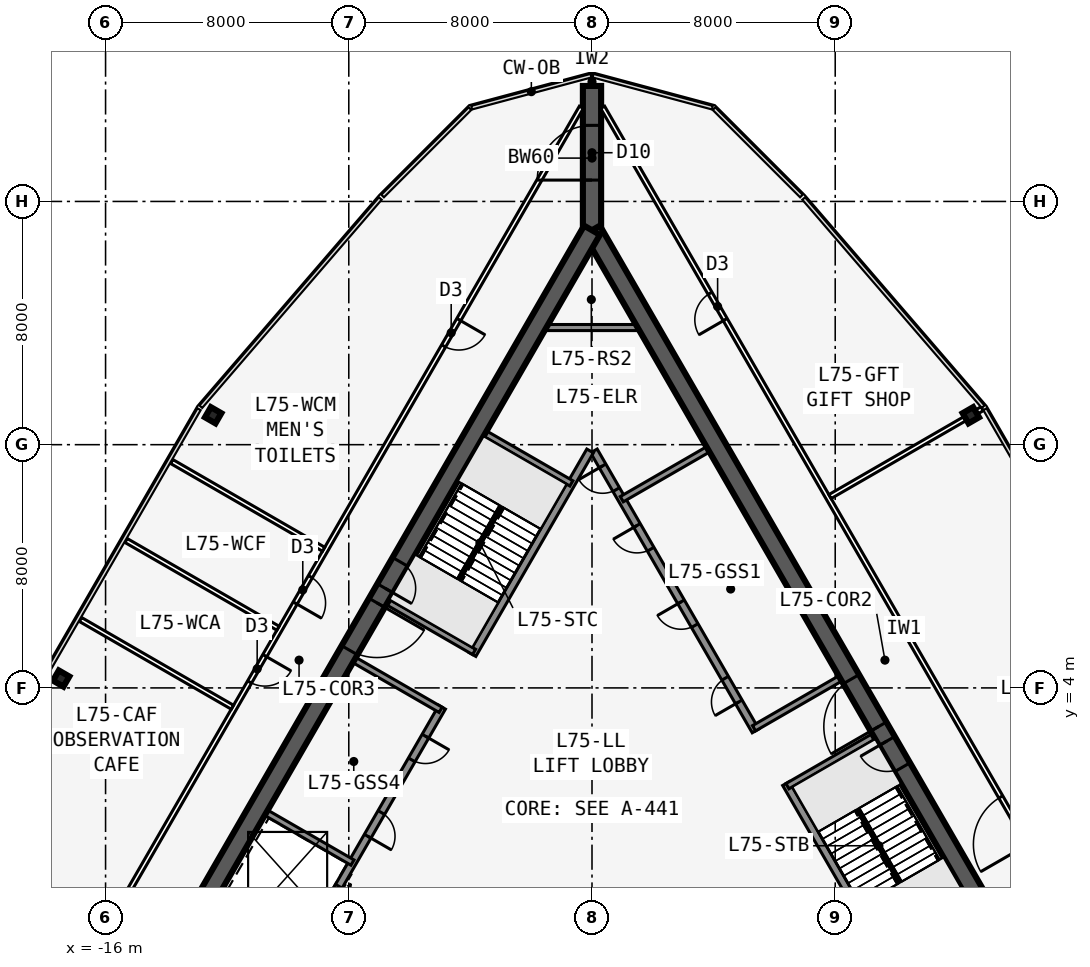
"""IFC4 building model, lengths in metres.
Left out: names, types, materials, properties, quantities, classifications, styles, units other than length and angle.
Written with IfcOpenShell. Run it as: python <this file> out.ifc"""

import sys

from ifc_helpers import new_model, si_unit, direction, frame, frame_2d, origin, origin_2d, place, context, subcontext, project, spatial, rectangle, i_section, extrude, element, fill, save


model = new_model("IFC4")
c1 = context("Model", 3, precision=1e-05, world=origin(), true_north=direction((0.0, 1.0)))
c2 = subcontext(c1, "Body", "Model", "MODEL_VIEW")
j1 = project(units=[si_unit("LENGTHUNIT", "METRE"), si_unit("PLANEANGLEUNIT", "RADIAN")], contexts=[c1])
p1 = place(None, origin())
s1 = spatial("IfcSite", under=j1, at=p1, CompositionType="ELEMENT")
p2 = place(p1, origin())
s2 = spatial("IfcBuilding", under=s1, at=p2, CompositionType="ELEMENT")
p3 = place(p2, frame((0.0, 0.0, 286.8)))
s3 = spatial("IfcBuildingStorey", under=s2, at=p3, CompositionType="ELEMENT", Elevation=286.8)
p4 = place(p3, frame((16.5, -9.526, 0.0), z_axis=(0.0, 0.0, 1.0), x_axis=(-0.499999749417, 0.866025548458, 0.0)))
e1 = element("IfcWall", 1, at=p4, inside=s3, PredefinedType="SHEAR", context=c2, shape_type="SweptSolid", body=[
    extrude(rectangle(XDim=33.0, YDim=0.6, at=frame_2d((16.5, 0.0))), origin(), (0.0, 0.0, 1.0), 6.0),
])
p5 = place(p4, frame((14.15, 0.0, 0.0)))
e2 = element("IfcOpeningElement", 2, at=p5, cuts=e1, PredefinedType="OPENING", context=c2, shape_type="SweptSolid", body=[
    extrude(rectangle(XDim=1.8, YDim=2.13, at=frame_2d((0.9, 1.065))), frame((0.0, 0.31, 0.0), z_axis=(0.0, -1.0, 0.0), x_axis=(1.0, 0.0, 0.0)), (0.0, 0.0, 1.0), 0.62),
])
p6 = place(p4, frame((12.6, 0.0, 0.0)))
e3 = element("IfcOpeningElement", 3, at=p6, cuts=e1, PredefinedType="OPENING", context=c2, shape_type="SweptSolid", body=[
    extrude(rectangle(XDim=1.0, YDim=2.13, at=frame_2d((0.5, 1.065))), frame((0.0, 0.31, 0.0), z_axis=(0.0, -1.0, 0.0), x_axis=(1.0, 0.0, 0.0)), (0.0, 0.0, 1.0), 0.62),
])
p7 = place(p3, frame((10.245, -5.843, 0.0), z_axis=(0.0, 0.0, 1.0), x_axis=(-0.499993009313, 0.866029439822, 0.0)))
e4 = element("IfcWall", 4, at=p7, inside=s3, PredefinedType="SOLIDWALL", context=c2, shape_type="SweptSolid", body=[
    extrude(rectangle(XDim=7.733, YDim=0.25, at=frame_2d((3.866, 0.0))), origin(), (0.0, 0.0, 1.0), 5.75),
])
p8 = place(p3, frame((5.379, 2.586, 0.0), z_axis=(0.0, 0.0, 1.0), x_axis=(-0.500001375892, 0.866024609411, 0.0)))
e5 = element("IfcWall", 5, at=p8, inside=s3, PredefinedType="SOLIDWALL", context=c2, shape_type="SweptSolid", body=[
    extrude(rectangle(XDim=10.633, YDim=0.25, at=frame_2d((5.316, 0.0))), origin(), (0.0, 0.0, 1.0), 5.75),
])
p9 = place(p8, frame((9.164, 0.0, 0.0)))
e6 = element("IfcOpeningElement", 6, at=p9, cuts=e5, PredefinedType="OPENING", context=c2, shape_type="SweptSolid", body=[
    extrude(rectangle(XDim=0.9, YDim=2.13, at=frame_2d((0.45, 1.065))), frame((0.0, 0.135, 0.0), z_axis=(0.0, -1.0, 0.0), x_axis=(1.0, 0.0, 0.0)), (0.0, 0.0, 1.0), 0.27),
])
p10 = place(p8, frame((1.1, 0.0, 0.0)))
e7 = element("IfcOpeningElement", 7, at=p10, cuts=e5, PredefinedType="OPENING", context=c2, shape_type="SweptSolid", body=[
    extrude(rectangle(XDim=0.9, YDim=2.13, at=frame_2d((0.45, 1.065))), frame((0.0, 0.135, 0.0), z_axis=(0.0, -1.0, 0.0), x_axis=(1.0, 0.0, 0.0)), (0.0, 0.0, 1.0), 0.27),
])
p11 = place(p8, frame((4.0, 0.0, 0.0)))
e8 = element("IfcOpeningElement", 8, at=p11, cuts=e5, PredefinedType="OPENING", context=c2, shape_type="SweptSolid", body=[
    extrude(rectangle(XDim=0.9, YDim=2.13, at=frame_2d((0.45, 1.065))), frame((0.0, 0.135, 0.0), z_axis=(0.0, -1.0, 0.0), x_axis=(1.0, 0.0, 0.0)), (0.0, 0.0, 1.0), 0.27),
])
p12 = place(p8, frame((6.9, 0.0, 0.0)))
e9 = element("IfcOpeningElement", 9, at=p12, cuts=e5, PredefinedType="OPENING", context=c2, shape_type="SweptSolid", body=[
    extrude(rectangle(XDim=0.9, YDim=2.13, at=frame_2d((0.45, 1.065))), frame((0.0, 0.135, 0.0), z_axis=(0.0, -1.0, 0.0), x_axis=(1.0, 0.0, 0.0)), (0.0, 0.0, 1.0), 0.27),
])
for number, where, z_axis, x_axis in (
    (10, (6.429, 0.767, 0.0), (0.0, 0.0, 1.0), (0.866, 0.5, 0.0)),
    (11, (5.329, 2.673, 0.0), (0.0, 0.0, 1.0), (0.866, 0.5, 0.0)),
    (12, (0.979, 10.207, 0.0), (0.0, 0.0, 1.0), (0.866, 0.5, 0.0)),
):
    element("IfcWall", number, at=place(p3, frame(where, z_axis=z_axis, x_axis=x_axis)), inside=s3, PredefinedType="SOLIDWALL", context=c2, shape_type="SweptSolid", body=[
        extrude(rectangle(XDim=3.275, YDim=0.2, at=frame_2d((1.637, 0.0))), origin(), (0.0, 0.0, 1.0), 5.75),
    ])
p13 = place(p3, frame((0.0, 19.052, 0.0), z_axis=(0.0, 0.0, 1.0), x_axis=(-0.499999749417, -0.866025548458, 0.0)))
e13 = element("IfcWall", 13, at=p13, inside=s3, PredefinedType="SHEAR", context=c2, shape_type="SweptSolid", body=[
    extrude(rectangle(XDim=33.0, YDim=0.6, at=frame_2d((16.5, 0.0))), origin(), (0.0, 0.0, 1.0), 6.0),
])
p14 = place(p13, frame((14.15, 0.0, 0.0)))
e14 = element("IfcOpeningElement", 14, at=p14, cuts=e13, PredefinedType="OPENING", context=c2, shape_type="SweptSolid", body=[
    extrude(rectangle(XDim=1.8, YDim=2.13, at=frame_2d((0.9, 1.065))), frame((0.0, 0.31, 0.0), z_axis=(0.0, -1.0, 0.0), x_axis=(1.0, 0.0, 0.0)), (0.0, 0.0, 1.0), 0.62),
])
p15 = place(p13, frame((12.6, 0.0, 0.0)))
e15 = element("IfcOpeningElement", 15, at=p15, cuts=e13, PredefinedType="OPENING", context=c2, shape_type="SweptSolid", body=[
    extrude(rectangle(XDim=1.0, YDim=2.13, at=frame_2d((0.5, 1.065))), frame((0.0, 0.31, 0.0), z_axis=(0.0, -1.0, 0.0), x_axis=(1.0, 0.0, 0.0)), (0.0, 0.0, 1.0), 0.62),
])
p16 = place(p3, frame((-0.062, 11.794, 0.0), z_axis=(0.0, 0.0, 1.0), x_axis=(-0.500006680225, -0.86602154692, 0.0)))
e16 = element("IfcWall", 16, at=p16, inside=s3, PredefinedType="SOLIDWALL", context=c2, shape_type="SweptSolid", body=[
    extrude(rectangle(XDim=7.733, YDim=0.25, at=frame_2d((3.866, 0.0))), origin(), (0.0, 0.0, 1.0), 5.75),
])
p17 = place(p3, frame((-4.929, 3.365, 0.0), z_axis=(0.0, 0.0, 1.0), x_axis=(-0.499991433582, -0.866030349552, 0.0)))
e17 = element("IfcWall", 17, at=p17, inside=s3, PredefinedType="SOLIDWALL", context=c2, shape_type="SweptSolid", body=[
    extrude(rectangle(XDim=10.633, YDim=0.25, at=frame_2d((5.316, 0.0))), origin(), (0.0, 0.0, 1.0), 5.75),
])
p18 = place(p17, frame((9.164, 0.0, 0.0)))
e18 = element("IfcOpeningElement", 18, at=p18, cuts=e17, PredefinedType="OPENING", context=c2, shape_type="SweptSolid", body=[
    extrude(rectangle(XDim=0.9, YDim=2.13, at=frame_2d((0.45, 1.065))), frame((0.0, 0.135, 0.0), z_axis=(0.0, -1.0, 0.0), x_axis=(1.0, 0.0, 0.0)), (0.0, 0.0, 1.0), 0.27),
])
p19 = place(p17, frame((1.1, 0.0, 0.0)))
e19 = element("IfcOpeningElement", 19, at=p19, cuts=e17, PredefinedType="OPENING", context=c2, shape_type="SweptSolid", body=[
    extrude(rectangle(XDim=0.9, YDim=2.13, at=frame_2d((0.45, 1.065))), frame((0.0, 0.135, 0.0), z_axis=(0.0, -1.0, 0.0), x_axis=(1.0, 0.0, 0.0)), (0.0, 0.0, 1.0), 0.27),
])
p20 = place(p17, frame((4.0, 0.0, 0.0)))
e20 = element("IfcOpeningElement", 20, at=p20, cuts=e17, PredefinedType="OPENING", context=c2, shape_type="SweptSolid", body=[
    extrude(rectangle(XDim=0.9, YDim=2.13, at=frame_2d((0.45, 1.065))), frame((0.0, 0.135, 0.0), z_axis=(0.0, -1.0, 0.0), x_axis=(1.0, 0.0, 0.0)), (0.0, 0.0, 1.0), 0.27),
])
p21 = place(p17, frame((6.8, 0.0, 0.0)))
e21 = element("IfcOpeningElement", 21, at=p21, cuts=e17, PredefinedType="OPENING", context=c2, shape_type="SweptSolid", body=[
    extrude(rectangle(XDim=1.1, YDim=2.13, at=frame_2d((0.55, 1.065))), frame((0.0, 0.135, 0.0), z_axis=(0.0, -1.0, 0.0), x_axis=(1.0, 0.0, 0.0)), (0.0, 0.0, 1.0), 0.27),
])
for number, where, z_axis, x_axis in (
    (22, (-0.679, 10.727, 0.0), (0.0, 0.0, 1.0), (-0.866, 0.5, 0.0)),
    (23, (-3.879, 5.184, 0.0), (0.0, 0.0, 1.0), (-0.866, 0.5, 0.0)),
    (24, (-4.979, 3.279, 0.0), (0.0, 0.0, 1.0), (-0.866, 0.5, 0.0)),
    (25, (-7.879, -1.744, 0.0), (0.0, 0.0, 1.0), (-0.866, 0.5, 0.0)),
    (26, (-9.329, -4.256, 0.0), (0.0, 0.0, 1.0), (-0.866, 0.5, 0.0)),
):
    element("IfcWall", number, at=place(p3, frame(where, z_axis=z_axis, x_axis=x_axis)), inside=s3, PredefinedType="SOLIDWALL", context=c2, shape_type="SweptSolid", body=[
        extrude(rectangle(XDim=3.275, YDim=0.2, at=frame_2d((1.637, 0.0))), origin(), (0.0, 0.0, 1.0), 5.75),
    ])
p22 = place(p3, frame((0.0, 19.052, 0.0), z_axis=(0.0, 0.0, 1.0), x_axis=(0.0, 1.0, 0.0)))
e27 = element("IfcWall", 27, at=p22, inside=s3, PredefinedType="SHEAR", context=c2, shape_type="SweptSolid", body=[
    extrude(rectangle(XDim=4.746, YDim=0.6, at=frame_2d((2.373, 0.0))), origin(), (0.0, 0.0, 1.0), 6.0),
])
p23 = place(p22, frame((1.65, 0.0, 0.0)))
e28 = element("IfcOpeningElement", 28, at=p23, cuts=e27, PredefinedType="OPENING", context=c2, shape_type="SweptSolid", body=[
    extrude(rectangle(XDim=1.8, YDim=2.13, at=frame_2d((0.9, 1.065))), frame((0.0, 0.31, 0.0), z_axis=(0.0, -1.0, 0.0), x_axis=(1.0, 0.0, 0.0)), (0.0, 0.0, 1.0), 0.62),
])
for number, where, z_axis, x_axis in (
    (29, (12.461, 12.968, 0.0), (0.0, 0.0, 1.0), (0.866, 0.5, 0.0)),
    (30, (-12.461, 12.968, 0.0), (0.0, 0.0, 1.0), (-0.866, 0.5, 0.0)),
    (31, (-17.461, 4.308, 0.0), (0.0, 0.0, 1.0), (-0.866, 0.5, 0.0)),
):
    element("IfcColumn", number, at=place(p3, frame(where, z_axis=z_axis, x_axis=x_axis)), inside=s3, PredefinedType="COLUMN", context=c2, shape_type="SweptSolid", body=[
        extrude(i_section(OverallWidth=0.399, OverallDepth=0.386, WebThickness=0.021, FlangeThickness=0.033, at=origin_2d()), origin(), (0.0, 0.0, 1.0), 6.0),
    ])
p24 = place(p3, frame((20.177, -11.245, 0.0), z_axis=(0.0, 0.0, 1.0), x_axis=(-0.499998875317, 0.866026053119, 0.0)))
e32 = element("IfcWall", 32, at=p24, inside=s3, PredefinedType="PARTITIONING", context=c2, shape_type="SweptSolid", body=[
    extrude(rectangle(XDim=39.654, YDim=0.15, at=frame_2d((19.827, 0.0))), origin(), (0.0, 0.0, 1.0), 5.75),
])
p25 = place(p24, frame((11.664, 0.0, 0.0)))
e33 = element("IfcOpeningElement", 33, at=p25, cuts=e32, PredefinedType="OPENING", context=c2, shape_type="SweptSolid", body=[
    extrude(rectangle(XDim=1.8, YDim=2.13, at=frame_2d((0.9, 1.065))), frame((0.0, 0.085, 0.0), z_axis=(0.0, -1.0, 0.0), x_axis=(1.0, 0.0, 0.0)), (0.0, 0.0, 1.0), 0.17),
])
p26 = place(p24, frame((31.591, 0.0, 0.0)))
e34 = element("IfcOpeningElement", 34, at=p26, cuts=e32, PredefinedType="OPENING", context=c2, shape_type="SweptSolid", body=[
    extrude(rectangle(XDim=1.0, YDim=2.13, at=frame_2d((0.5, 1.065))), frame((0.0, 0.085, 0.0), z_axis=(0.0, -1.0, 0.0), x_axis=(1.0, 0.0, 0.0)), (0.0, 0.0, 1.0), 0.17),
])
p27 = place(p3, frame((7.829, 10.293, 0.0), z_axis=(0.0, 0.0, 1.0), x_axis=(0.866003332883, 0.500038225974, 0.0)))
e35 = element("IfcWall", 35, at=p27, inside=s3, PredefinedType="PARTITIONING", context=c2, shape_type="SweptSolid", body=[
    extrude(rectangle(XDim=5.778, YDim=0.15, at=frame_2d((2.889, 0.0))), origin(), (0.0, 0.0, 1.0), 4.894),
])
p28 = place(p3, frame((-0.35, 23.096, 0.0), z_axis=(0.0, 0.0, 1.0), x_axis=(-0.499998875317, -0.866026053119, 0.0)))
e36 = element("IfcWall", 36, at=p28, inside=s3, PredefinedType="PARTITIONING", context=c2, shape_type="SweptSolid", body=[
    extrude(rectangle(XDim=39.654, YDim=0.15, at=frame_2d((19.827, 0.0))), origin(), (0.0, 0.0, 1.0), 5.75),
])
p29 = place(p28, frame((8.063, 0.0, 0.0)))
e37 = element("IfcOpeningElement", 37, at=p29, cuts=e36, PredefinedType="OPENING", context=c2, shape_type="SweptSolid", body=[
    extrude(rectangle(XDim=1.0, YDim=2.13, at=frame_2d((0.5, 1.065))), frame((0.0, 0.085, 0.0), z_axis=(0.0, -1.0, 0.0), x_axis=(1.0, 0.0, 0.0)), (0.0, 0.0, 1.0), 0.17),
])
p30 = place(p28, frame((17.827, 0.0, 0.0)))
e38 = element("IfcOpeningElement", 38, at=p30, cuts=e36, PredefinedType="OPENING", context=c2, shape_type="SweptSolid", body=[
    extrude(rectangle(XDim=1.0, YDim=2.13, at=frame_2d((0.5, 1.065))), frame((0.0, 0.085, 0.0), z_axis=(0.0, -1.0, 0.0), x_axis=(1.0, 0.0, 0.0)), (0.0, 0.0, 1.0), 0.17),
])
p31 = place(p28, frame((20.827, 0.0, 0.0)))
e39 = element("IfcOpeningElement", 39, at=p31, cuts=e36, PredefinedType="OPENING", context=c2, shape_type="SweptSolid", body=[
    extrude(rectangle(XDim=1.0, YDim=2.13, at=frame_2d((0.5, 1.065))), frame((0.0, 0.085, 0.0), z_axis=(0.0, -1.0, 0.0), x_axis=(1.0, 0.0, 0.0)), (0.0, 0.0, 1.0), 0.17),
])
p32 = place(p28, frame((30.19, 0.0, 0.0)))
e40 = element("IfcOpeningElement", 40, at=p32, cuts=e36, PredefinedType="OPENING", context=c2, shape_type="SweptSolid", body=[
    extrude(rectangle(XDim=1.8, YDim=2.13, at=frame_2d((0.9, 1.065))), frame((0.0, 0.085, 0.0), z_axis=(0.0, -1.0, 0.0), x_axis=(1.0, 0.0, 0.0)), (0.0, 0.0, 1.0), 0.17),
])
p33 = place(p3, frame((-8.829, 8.561, 0.0), z_axis=(0.0, 0.0, 1.0), x_axis=(-0.866015751745, 0.50001671745, 0.0)))
e41 = element("IfcWall", 41, at=p33, inside=s3, PredefinedType="PARTITIONING", context=c2, shape_type="SweptSolid", body=[
    extrude(rectangle(XDim=5.769, YDim=0.15, at=frame_2d((2.885, 0.0))), origin(), (0.0, 0.0, 1.0), 5.75),
])
p34 = place(p3, frame((-10.329, 5.963, 0.0), z_axis=(0.0, 0.0, 1.0), x_axis=(-0.866015751745, 0.50001671745, 0.0)))
e42 = element("IfcWall", 42, at=p34, inside=s3, PredefinedType="PARTITIONING", context=c2, shape_type="SweptSolid", body=[
    extrude(rectangle(XDim=5.769, YDim=0.15, at=frame_2d((2.885, 0.0))), origin(), (0.0, 0.0, 1.0), 4.894),
])
p35 = place(p3, frame((-11.829, 3.365, 0.0), z_axis=(0.0, 0.0, 1.0), x_axis=(-0.866015751745, 0.50001671745, 0.0)))
e43 = element("IfcWall", 43, at=p35, inside=s3, PredefinedType="PARTITIONING", context=c2, shape_type="SweptSolid", body=[
    extrude(rectangle(XDim=5.769, YDim=0.15, at=frame_2d((2.885, 0.0))), origin(), (0.0, 0.0, 1.0), 5.75),
])
p36 = place(p3, frame((0.0, 23.799, 0.0), z_axis=(0.0, 0.0, 1.0), x_axis=(0.0, 1.0, 0.0)))
e44 = element("IfcWall", 44, at=p36, inside=s3, PredefinedType="PARTITIONING", context=c2, shape_type="SweptSolid", body=[
    extrude(rectangle(XDim=0.27, YDim=0.15, at=frame_2d((0.135, 0.0))), origin(), (0.0, 0.0, 1.0), 5.75),
])
p37 = place(p3, frame((-1.501, 15.853, 0.0), z_axis=(0.0, 0.0, 1.0), x_axis=(1.0, 0.0, 0.0)))
e45 = element("IfcWall", 45, at=p37, inside=s3, PredefinedType="SOLIDWALL", context=c2, shape_type="SweptSolid", body=[
    extrude(rectangle(XDim=3.002, YDim=0.2, at=frame_2d((1.501, 0.0))), origin(), (0.0, 0.0, 1.0), 5.75),
])
for number, where, z_axis, x_axis in (
    (46, (10.135, -2.401, 0.0), (0.0, 0.0, 1.0), (-0.5, 0.866, 0.0)),
    (47, (-2.988, 9.978, 0.0), (0.0, 0.0, 1.0), (-0.5, -0.866, 0.0)),
):
    element("IfcWall", number, at=place(p3, frame(where, z_axis=z_axis, x_axis=x_axis)), inside=s3, PredefinedType="SOLIDWALL", context=c2, shape_type="SweptSolid", body=[
        extrude(rectangle(XDim=2.794, YDim=0.1, at=frame_2d((1.397, 0.0))), origin(), (0.0, 0.0, 1.0), 6.0),
    ])
p38 = place(p25, origin())
e48 = element("IfcDoor", 48, at=p38, inside=s3, OperationType="DOUBLE_DOOR_SINGLE_SWING", PredefinedType="DOOR", context=c2, shape_type="SweptSolid", body=[
    extrude(rectangle(XDim=1.8, YDim=2.13, at=frame_2d((0.9, 1.065))), frame((0.0, 0.025, 0.0), z_axis=(0.0, -1.0, 0.0), x_axis=(1.0, 0.0, 0.0)), (0.0, 0.0, 1.0), 0.05),
])
fill(e33, e48)
p39 = place(p26, origin())
e49 = element("IfcDoor", 49, at=p39, inside=s3, OperationType="SINGLE_SWING_LEFT", PredefinedType="DOOR", context=c2, shape_type="SweptSolid", body=[
    extrude(rectangle(XDim=1.0, YDim=2.13, at=frame_2d((0.5, 1.065))), frame((0.0, 0.025, 0.0), z_axis=(0.0, -1.0, 0.0), x_axis=(1.0, 0.0, 0.0)), (0.0, 0.0, 1.0), 0.05),
])
fill(e34, e49)
p40 = place(p29, origin())
e50 = element("IfcDoor", 50, at=p40, inside=s3, OperationType="SINGLE_SWING_LEFT", PredefinedType="DOOR", context=c2, shape_type="SweptSolid", body=[
    extrude(rectangle(XDim=1.0, YDim=2.13, at=frame_2d((0.5, 1.065))), frame((0.0, 0.025, 0.0), z_axis=(0.0, -1.0, 0.0), x_axis=(1.0, 0.0, 0.0)), (0.0, 0.0, 1.0), 0.05),
])
fill(e37, e50)
p41 = place(p30, origin())
e51 = element("IfcDoor", 51, at=p41, inside=s3, OperationType="SINGLE_SWING_RIGHT", PredefinedType="DOOR", context=c2, shape_type="SweptSolid", body=[
    extrude(rectangle(XDim=1.0, YDim=2.13, at=frame_2d((0.5, 1.065))), frame((0.0, 0.025, 0.0), z_axis=(0.0, -1.0, 0.0), x_axis=(1.0, 0.0, 0.0)), (0.0, 0.0, 1.0), 0.05),
])
fill(e38, e51)
p42 = place(p31, origin())
e52 = element("IfcDoor", 52, at=p42, inside=s3, OperationType="SINGLE_SWING_LEFT", PredefinedType="DOOR", context=c2, shape_type="SweptSolid", body=[
    extrude(rectangle(XDim=1.0, YDim=2.13, at=frame_2d((0.5, 1.065))), frame((0.0, 0.025, 0.0), z_axis=(0.0, -1.0, 0.0), x_axis=(1.0, 0.0, 0.0)), (0.0, 0.0, 1.0), 0.05),
])
fill(e39, e52)
p43 = place(p5, origin())
e53 = element("IfcDoor", 53, at=p43, inside=s3, OperationType="DOUBLE_DOOR_SINGLE_SWING", PredefinedType="DOOR", context=c2, shape_type="SweptSolid", body=[
    extrude(rectangle(XDim=1.8, YDim=2.13, at=frame_2d((0.9, 1.065))), frame((0.0, 0.025, 0.0), z_axis=(0.0, -1.0, 0.0), x_axis=(1.0, 0.0, 0.0)), (0.0, 0.0, 1.0), 0.05),
])
fill(e2, e53)
p44 = place(p6, origin())
e54 = element("IfcDoor", 54, at=p44, inside=s3, OperationType="SINGLE_SWING_RIGHT", PredefinedType="DOOR", context=c2, shape_type="SweptSolid", body=[
    extrude(rectangle(XDim=1.0, YDim=2.13, at=frame_2d((0.5, 1.065))), frame((0.0, 0.025, 0.0), z_axis=(0.0, -1.0, 0.0), x_axis=(1.0, 0.0, 0.0)), (0.0, 0.0, 1.0), 0.05),
])
fill(e3, e54)
p45 = place(p14, origin())
e55 = element("IfcDoor", 55, at=p45, inside=s3, OperationType="DOUBLE_DOOR_SINGLE_SWING", PredefinedType="DOOR", context=c2, shape_type="SweptSolid", body=[
    extrude(rectangle(XDim=1.8, YDim=2.13, at=frame_2d((0.9, 1.065))), frame((0.0, 0.025, 0.0), z_axis=(0.0, -1.0, 0.0), x_axis=(1.0, 0.0, 0.0)), (0.0, 0.0, 1.0), 0.05),
])
fill(e14, e55)
p46 = place(p15, origin())
e56 = element("IfcDoor", 56, at=p46, inside=s3, OperationType="SINGLE_SWING_RIGHT", PredefinedType="DOOR", context=c2, shape_type="SweptSolid", body=[
    extrude(rectangle(XDim=1.0, YDim=2.13, at=frame_2d((0.5, 1.065))), frame((0.0, 0.025, 0.0), z_axis=(0.0, -1.0, 0.0), x_axis=(1.0, 0.0, 0.0)), (0.0, 0.0, 1.0), 0.05),
])
fill(e15, e56)
p47 = place(p23, origin())
e57 = element("IfcDoor", 57, at=p47, inside=s3, OperationType="DOUBLE_DOOR_DOUBLE_SWING", PredefinedType="DOOR", context=c2, shape_type="SweptSolid", body=[
    extrude(rectangle(XDim=1.8, YDim=2.13, at=frame_2d((0.9, 1.065))), frame((0.0, 0.025, 0.0), z_axis=(0.0, -1.0, 0.0), x_axis=(1.0, 0.0, 0.0)), (0.0, 0.0, 1.0), 0.05),
])
fill(e28, e57)
p48 = place(p9, origin())
e58 = element("IfcDoor", 58, at=p48, inside=s3, OperationType="SINGLE_SWING_RIGHT", PredefinedType="DOOR", context=c2, shape_type="SweptSolid", body=[
    extrude(rectangle(XDim=0.9, YDim=2.13, at=frame_2d((0.45, 1.065))), frame((0.0, 0.025, 0.0), z_axis=(0.0, -1.0, 0.0), x_axis=(1.0, 0.0, 0.0)), (0.0, 0.0, 1.0), 0.05),
])
fill(e6, e58)
p49 = place(p10, origin())
e59 = element("IfcDoor", 59, at=p49, inside=s3, OperationType="SINGLE_SWING_LEFT", PredefinedType="DOOR", context=c2, shape_type="SweptSolid", body=[
    extrude(rectangle(XDim=0.9, YDim=2.13, at=frame_2d((0.45, 1.065))), frame((0.0, 0.025, 0.0), z_axis=(0.0, -1.0, 0.0), x_axis=(1.0, 0.0, 0.0)), (0.0, 0.0, 1.0), 0.05),
])
fill(e7, e59)
p50 = place(p11, origin())
e60 = element("IfcDoor", 60, at=p50, inside=s3, OperationType="SINGLE_SWING_RIGHT", PredefinedType="DOOR", context=c2, shape_type="SweptSolid", body=[
    extrude(rectangle(XDim=0.9, YDim=2.13, at=frame_2d((0.45, 1.065))), frame((0.0, 0.025, 0.0), z_axis=(0.0, -1.0, 0.0), x_axis=(1.0, 0.0, 0.0)), (0.0, 0.0, 1.0), 0.05),
])
fill(e8, e60)
p51 = place(p12, origin())
e61 = element("IfcDoor", 61, at=p51, inside=s3, OperationType="SINGLE_SWING_RIGHT", PredefinedType="DOOR", context=c2, shape_type="SweptSolid", body=[
    extrude(rectangle(XDim=0.9, YDim=2.13, at=frame_2d((0.45, 1.065))), frame((0.0, 0.025, 0.0), z_axis=(0.0, -1.0, 0.0), x_axis=(1.0, 0.0, 0.0)), (0.0, 0.0, 1.0), 0.05),
])
fill(e9, e61)
p52 = place(p19, origin())
e62 = element("IfcDoor", 62, at=p52, inside=s3, OperationType="SINGLE_SWING_LEFT", PredefinedType="DOOR", context=c2, shape_type="SweptSolid", body=[
    extrude(rectangle(XDim=0.9, YDim=2.13, at=frame_2d((0.45, 1.065))), frame((0.0, 0.025, 0.0), z_axis=(0.0, -1.0, 0.0), x_axis=(1.0, 0.0, 0.0)), (0.0, 0.0, 1.0), 0.05),
])
fill(e19, e62)
p53 = place(p20, origin())
e63 = element("IfcDoor", 63, at=p53, inside=s3, OperationType="SINGLE_SWING_RIGHT", PredefinedType="DOOR", context=c2, shape_type="SweptSolid", body=[
    extrude(rectangle(XDim=0.9, YDim=2.13, at=frame_2d((0.45, 1.065))), frame((0.0, 0.025, 0.0), z_axis=(0.0, -1.0, 0.0), x_axis=(1.0, 0.0, 0.0)), (0.0, 0.0, 1.0), 0.05),
])
fill(e20, e63)
p54 = place(p21, origin())
e64 = element("IfcDoor", 64, at=p54, inside=s3, OperationType="DOUBLE_DOOR_SLIDING", PredefinedType="USERDEFINED", context=c2, shape_type="SweptSolid", body=[
    extrude(rectangle(XDim=1.1, YDim=2.13, at=frame_2d((0.55, 1.065))), frame((0.0, 0.025, 0.0), z_axis=(0.0, -1.0, 0.0), x_axis=(1.0, 0.0, 0.0)), (0.0, 0.0, 1.0), 0.05),
])
fill(e21, e64)
save(model, sys.argv[1])
